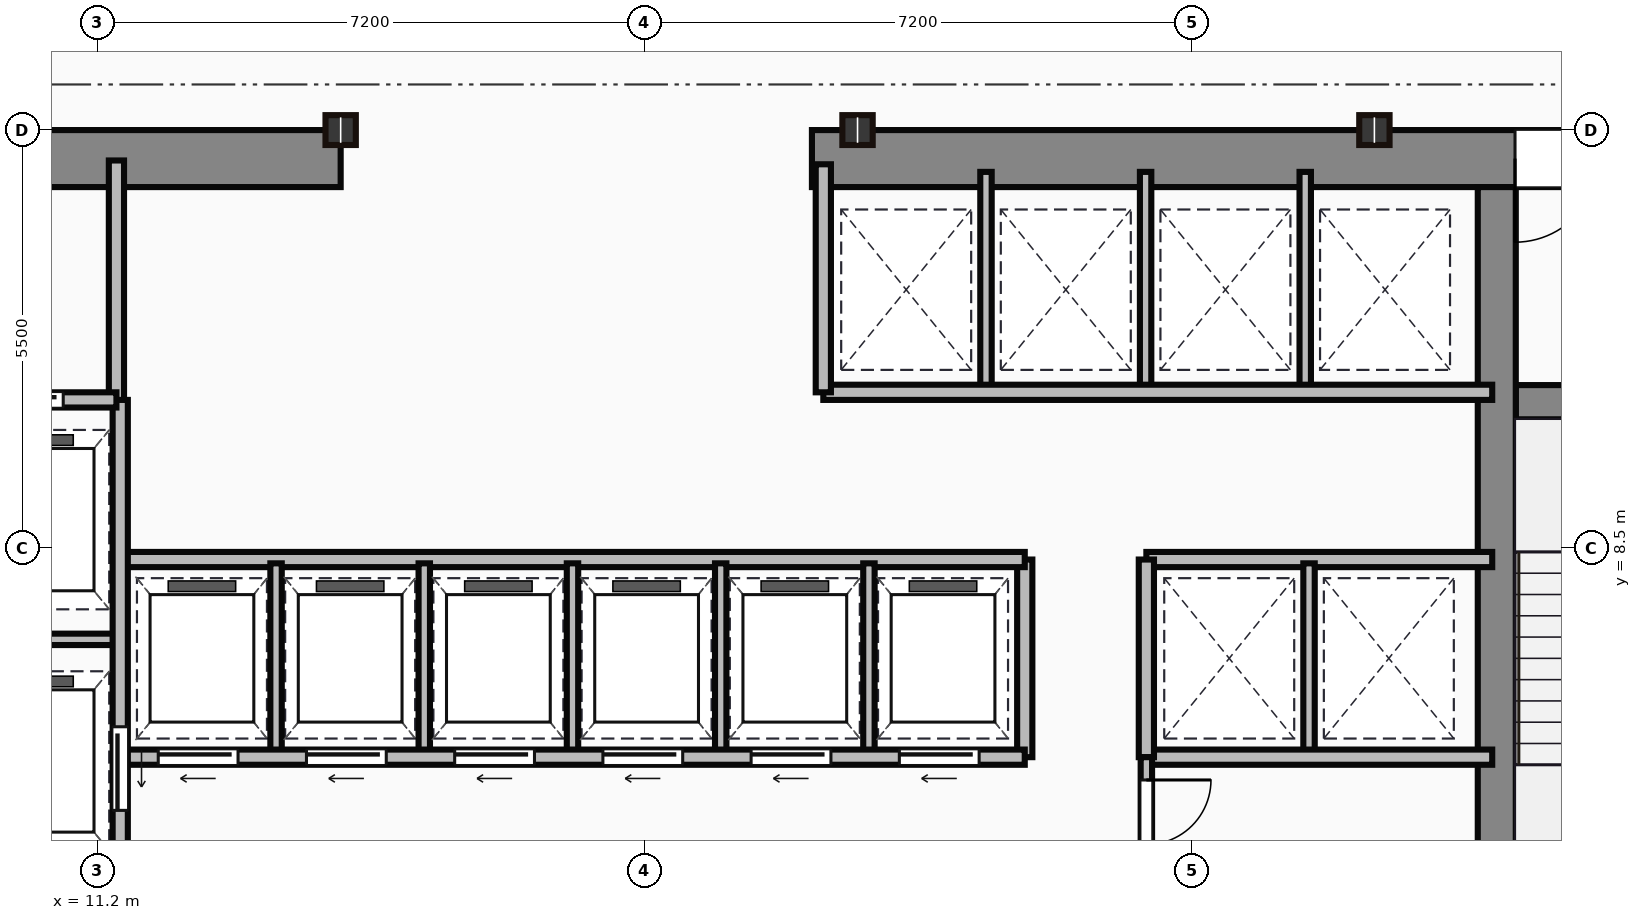
"""IFC4 building model, lengths in metres.
Left out: names, types, materials, properties, quantities, classifications, styles, units other than length and angle.
Written with IfcOpenShell. Run it as: python <this file> out.ifc"""

import sys

from ifc_helpers import new_model, si_unit, direction, frame, frame_2d, origin, origin_2d, place, context, subcontext, project, spatial, rectangle, i_section, extrude, source, transform, mapped, element, fill, save


model = new_model("IFC4")
c1 = context("Model", 3, precision=1e-05, world=origin(), true_north=direction((0.0, 1.0)))
c2 = subcontext(c1, "Body", "Model", "MODEL_VIEW")
j1 = project(units=[si_unit("LENGTHUNIT", "METRE"), si_unit("PLANEANGLEUNIT", "RADIAN")], contexts=[c1])
p1 = place(None, origin())
s1 = spatial("IfcSite", under=j1, at=p1, CompositionType="ELEMENT")
p2 = place(p1, origin())
s2 = spatial("IfcBuilding", under=s1, at=p2, CompositionType="ELEMENT")
p3 = place(p2, frame((0.0, 0.0, 92.3)))
s3 = spatial("IfcBuildingStorey", under=s2, at=p3, CompositionType="ELEMENT", Elevation=92.3)
m1 = source(origin(), c2, "Body", "SweptSolid", [
    extrude(rectangle(XDim=9.1, YDim=0.75, at=frame_2d((4.55, 0.0))), origin(), (0.0, 0.0, 1.0), 3.65),
])
p4 = place(p3, frame((5.3, 13.625, 0.0), z_axis=(0.0, 0.0, 1.0), x_axis=(1.0, 0.0, 0.0)))
e1 = element("IfcWall", 1, at=p4, inside=s3, PredefinedType="SHEAR", context=c2, shape_type="MappedRepresentation", body=[
    mapped(m1, transform((0.0, 0.0, 0.0))),
])
p5 = place(p4, frame((4.1, 0.0, 0.0)))
e2 = element("IfcOpeningElement", 2, at=p5, cuts=e1, PredefinedType="OPENING", context=c2, shape_type="SweptSolid", body=[
    extrude(rectangle(XDim=1.1, YDim=2.15, at=frame_2d((0.55, 1.075))), frame((0.0, 0.385, 0.0), z_axis=(0.0, -1.0, 0.0), x_axis=(1.0, 0.0, 0.0)), (0.0, 0.0, 1.0), 0.77),
])
m2 = source(origin(), c2, "Body", "SweptSolid", [
    extrude(rectangle(XDim=12.6, YDim=0.75, at=frame_2d((6.3, 0.0))), origin(), (0.0, 0.0, 1.0), 3.65),
])
p6 = place(p3, frame((20.6, 13.625, 0.0), z_axis=(0.0, 0.0, 1.0), x_axis=(1.0, 0.0, 0.0)))
e3 = element("IfcWall", 3, at=p6, inside=s3, PredefinedType="SHEAR", context=c2, shape_type="MappedRepresentation", body=[
    mapped(m2, transform((0.0, 0.0, 0.0))),
])
p7 = place(p6, frame((9.25, 0.0, 0.0)))
e4 = element("IfcOpeningElement", 4, at=p7, cuts=e3, PredefinedType="OPENING", context=c2, shape_type="SweptSolid", body=[
    extrude(rectangle(XDim=1.1, YDim=2.15, at=frame_2d((0.55, 1.075))), frame((0.0, 0.385, 0.0), z_axis=(0.0, -1.0, 0.0), x_axis=(1.0, 0.0, 0.0)), (0.0, 0.0, 1.0), 0.77),
])
m3 = source(origin(), c2, "Body", "SweptSolid", [
    extrude(rectangle(XDim=12.35, YDim=0.5, at=frame_2d((6.175, 0.0))), origin(), (0.0, 0.0, 1.0), 3.65),
])
p8 = place(p3, frame((29.61, 0.9, 0.0), z_axis=(0.0, 0.0, 1.0), x_axis=(0.0, 1.0, 0.0)))
e5 = element("IfcWall", 5, at=p8, inside=s3, PredefinedType="SHEAR", context=c2, shape_type="MappedRepresentation", body=[
    mapped(m3, transform((0.0, 0.0, 0.0))),
])
m4 = source(origin(), c2, "Body", "SweptSolid", [
    extrude(rectangle(XDim=3.39, YDim=0.45, at=frame_2d((1.695, 0.0))), origin(), (0.0, 0.0, 1.0), 3.65),
])
p9 = place(p3, frame((29.86, 10.42, 0.0), z_axis=(0.0, 0.0, 1.0), x_axis=(1.0, 0.0, 0.0)))
e6 = element("IfcWall", 6, at=p9, inside=s3, PredefinedType="SHEAR", context=c2, shape_type="MappedRepresentation", body=[
    mapped(m4, transform((0.0, 0.0, 0.0))),
])
p10 = place(p9, frame((1.1, 0.0, 0.0)))
e7 = element("IfcOpeningElement", 7, at=p10, cuts=e6, PredefinedType="OPENING", context=c2, shape_type="SweptSolid", body=[
    extrude(rectangle(XDim=1.1, YDim=2.15, at=frame_2d((0.55, 1.075))), frame((0.0, 0.235, 0.0), z_axis=(0.0, -1.0, 0.0), x_axis=(1.0, 0.0, 0.0)), (0.0, 0.0, 1.0), 0.47),
])
m5 = source(origin(), c2, "Body", "SweptSolid", [
    extrude(i_section(OverallWidth=0.399, OverallDepth=0.393, WebThickness=0.023, FlangeThickness=0.037, at=origin_2d()), origin(), (0.0, 0.0, 1.0), 3.65),
])
for number, where, z_axis, x_axis in (
    (8, (14.4, 14.0, 0.0), (0.0, 0.0, 1.0), (1.0, 0.0, 0.0)),
    (9, (21.2, 14.0, 0.0), (0.0, 0.0, 1.0), (1.0, 0.0, 0.0)),
    (10, (28.0, 14.0, 0.0), (0.0, 0.0, 1.0), (1.0, 0.0, 0.0)),
):
    element("IfcColumn", number, at=place(p3, frame(where, z_axis=z_axis, x_axis=x_axis)), inside=s3, PredefinedType="COLUMN", context=c2, shape_type="MappedRepresentation", body=[
        mapped(m5, transform((0.0, 0.0, 0.0))),
    ])
m6 = source(origin(), c2, "Body", "SweptSolid", [
    extrude(rectangle(XDim=3.18, YDim=0.2, at=frame_2d((1.59, 0.0))), origin(), (0.0, 0.0, 1.0), 3.4),
])
p11 = place(p3, frame((11.45, 10.42, 0.0), z_axis=(0.0, 0.0, 1.0), x_axis=(0.0, 1.0, 0.0)))
e11 = element("IfcWall", 11, at=p11, inside=s3, PredefinedType="PARTITIONING", context=c2, shape_type="MappedRepresentation", body=[
    mapped(m6, transform((0.0, 0.0, 0.0))),
])
m7 = source(origin(), c2, "Body", "SweptSolid", [
    extrude(rectangle(XDim=2.35, YDim=0.2, at=frame_2d((1.175, 0.0))), origin(), (0.0, 0.0, 1.0), 3.4),
])
p12 = place(p3, frame((9.1, 10.45, 0.0), z_axis=(0.0, 0.0, 1.0), x_axis=(1.0, 0.0, 0.0)))
e12 = element("IfcWall", 12, at=p12, inside=s3, PredefinedType="PARTITIONING", context=c2, shape_type="MappedRepresentation", body=[
    mapped(m7, transform((0.0, 0.0, 0.0))),
])
p13 = place(p12, frame((0.55, 0.0, 0.0)))
e13 = element("IfcOpeningElement", 13, at=p13, cuts=e12, PredefinedType="OPENING", context=c2, shape_type="SweptSolid", body=[
    extrude(rectangle(XDim=1.1, YDim=2.15, at=frame_2d((0.55, 1.075))), frame((0.0, 0.11, 0.0), z_axis=(0.0, -1.0, 0.0), x_axis=(1.0, 0.0, 0.0)), (0.0, 0.0, 1.0), 0.22),
])
m8 = source(origin(), c2, "Body", "SweptSolid", [
    extrude(rectangle(XDim=9.6, YDim=0.2, at=frame_2d((4.8, 0.0))), origin(), (0.0, 0.0, 1.0), 3.4),
])
p14 = place(p3, frame((11.5, 0.85, 0.0), z_axis=(0.0, 0.0, 1.0), x_axis=(0.0, 1.0, 0.0)))
e14 = element("IfcWall", 14, at=p14, inside=s3, PredefinedType="PARTITIONING", context=c2, shape_type="MappedRepresentation", body=[
    mapped(m8, transform((0.0, 0.0, 0.0))),
])
p15 = place(p14, frame((4.2, 0.0, 0.0)))
e15 = element("IfcOpeningElement", 15, at=p15, cuts=e14, PredefinedType="OPENING", context=c2, shape_type="SweptSolid", body=[
    extrude(rectangle(XDim=1.1, YDim=2.15, at=frame_2d((0.55, 1.075))), frame((0.0, 0.11, 0.0), z_axis=(0.0, -1.0, 0.0), x_axis=(1.0, 0.0, 0.0)), (0.0, 0.0, 1.0), 0.22),
])
p16 = place(p14, frame((0.9, 0.0, 0.0)))
e16 = element("IfcOpeningElement", 16, at=p16, cuts=e14, PredefinedType="OPENING", context=c2, shape_type="SweptSolid", body=[
    extrude(rectangle(XDim=1.2, YDim=2.15, at=frame_2d((0.6, 1.075))), frame((0.0, 0.11, 0.0), z_axis=(0.0, -1.0, 0.0), x_axis=(1.0, 0.0, 0.0)), (0.0, 0.0, 1.0), 0.22),
])
m9 = source(origin(), c2, "Body", "SweptSolid", [
    extrude(rectangle(XDim=2.4, YDim=0.15, at=frame_2d((1.2, 0.0))), origin(), (0.0, 0.0, 1.0), 3.4),
])
p17 = place(p3, frame((9.1, 7.3, 0.0), z_axis=(0.0, 0.0, 1.0), x_axis=(1.0, 0.0, 0.0)))
e17 = element("IfcWall", 17, at=p17, inside=s3, PredefinedType="PARTITIONING", context=c2, shape_type="MappedRepresentation", body=[
    mapped(m9, transform((0.0, 0.0, 0.0))),
])
m10 = source(origin(), c2, "Body", "SweptSolid", [
    extrude(rectangle(XDim=11.85, YDim=0.2, at=frame_2d((5.925, 0.0))), origin(), (0.0, 0.0, 1.0), 3.4),
])
p18 = place(p3, frame((11.55, 5.75, 0.0), z_axis=(0.0, 0.0, 1.0), x_axis=(1.0, 0.0, 0.0)))
e18 = element("IfcWall", 18, at=p18, inside=s3, PredefinedType="PARTITIONING", context=c2, shape_type="MappedRepresentation", body=[
    mapped(m10, transform((0.0, 0.0, 0.0))),
])
p19 = place(p18, frame((0.45, 0.0, 0.0)))
e19 = element("IfcOpeningElement", 19, at=p19, cuts=e18, PredefinedType="OPENING", context=c2, shape_type="SweptSolid", body=[
    extrude(rectangle(XDim=1.05, YDim=2.15, at=frame_2d((0.525, 1.075))), frame((0.0, 0.11, 0.0), z_axis=(0.0, -1.0, 0.0), x_axis=(1.0, 0.0, 0.0)), (0.0, 0.0, 1.0), 0.22),
])
p20 = place(p18, frame((2.4, 0.0, 0.0)))
e20 = element("IfcOpeningElement", 20, at=p20, cuts=e18, PredefinedType="OPENING", context=c2, shape_type="SweptSolid", body=[
    extrude(rectangle(XDim=1.05, YDim=2.15, at=frame_2d((0.525, 1.075))), frame((0.0, 0.11, 0.0), z_axis=(0.0, -1.0, 0.0), x_axis=(1.0, 0.0, 0.0)), (0.0, 0.0, 1.0), 0.22),
])
p21 = place(p18, frame((4.35, 0.0, 0.0)))
e21 = element("IfcOpeningElement", 21, at=p21, cuts=e18, PredefinedType="OPENING", context=c2, shape_type="SweptSolid", body=[
    extrude(rectangle(XDim=1.05, YDim=2.15, at=frame_2d((0.525, 1.075))), frame((0.0, 0.11, 0.0), z_axis=(0.0, -1.0, 0.0), x_axis=(1.0, 0.0, 0.0)), (0.0, 0.0, 1.0), 0.22),
])
p22 = place(p18, frame((6.3, 0.0, 0.0)))
e22 = element("IfcOpeningElement", 22, at=p22, cuts=e18, PredefinedType="OPENING", context=c2, shape_type="SweptSolid", body=[
    extrude(rectangle(XDim=1.05, YDim=2.15, at=frame_2d((0.525, 1.075))), frame((0.0, 0.11, 0.0), z_axis=(0.0, -1.0, 0.0), x_axis=(1.0, 0.0, 0.0)), (0.0, 0.0, 1.0), 0.22),
])
p23 = place(p18, frame((8.25, 0.0, 0.0)))
e23 = element("IfcOpeningElement", 23, at=p23, cuts=e18, PredefinedType="OPENING", context=c2, shape_type="SweptSolid", body=[
    extrude(rectangle(XDim=1.05, YDim=2.15, at=frame_2d((0.525, 1.075))), frame((0.0, 0.11, 0.0), z_axis=(0.0, -1.0, 0.0), x_axis=(1.0, 0.0, 0.0)), (0.0, 0.0, 1.0), 0.22),
])
p24 = place(p18, frame((10.2, 0.0, 0.0)))
e24 = element("IfcOpeningElement", 24, at=p24, cuts=e18, PredefinedType="OPENING", context=c2, shape_type="SweptSolid", body=[
    extrude(rectangle(XDim=1.05, YDim=2.15, at=frame_2d((0.525, 1.075))), frame((0.0, 0.11, 0.0), z_axis=(0.0, -1.0, 0.0), x_axis=(1.0, 0.0, 0.0)), (0.0, 0.0, 1.0), 0.22),
])
p25 = place(p3, frame((11.55, 8.35, 0.0), z_axis=(0.0, 0.0, 1.0), x_axis=(1.0, 0.0, 0.0)))
e25 = element("IfcWall", 25, at=p25, inside=s3, PredefinedType="PARTITIONING", context=c2, shape_type="MappedRepresentation", body=[
    mapped(m10, transform((0.0, 0.0, 0.0))),
])
m11 = source(origin(), c2, "Body", "SweptSolid", [
    extrude(rectangle(XDim=2.6, YDim=0.2, at=frame_2d((1.3, 0.0))), origin(), (0.0, 0.0, 1.0), 3.4),
])
p26 = place(p3, frame((23.4, 5.75, 0.0), z_axis=(0.0, 0.0, 1.0), x_axis=(0.0, 1.0, 0.0)))
e26 = element("IfcWall", 26, at=p26, inside=s3, PredefinedType="PARTITIONING", context=c2, shape_type="MappedRepresentation", body=[
    mapped(m11, transform((0.0, 0.0, 0.0))),
])
m12 = source(origin(), c2, "Body", "SweptSolid", [
    extrude(rectangle(XDim=2.5, YDim=0.15, at=frame_2d((1.25, 0.0))), origin(), (0.0, 0.0, 1.0), 3.4),
])
for number, where, z_axis, x_axis in (
    (27, (13.55, 5.8, 0.0), (0.0, 0.0, 1.0), (0.0, 1.0, 0.0)),
    (28, (15.5, 5.8, 0.0), (0.0, 0.0, 1.0), (0.0, 1.0, 0.0)),
    (29, (17.45, 5.8, 0.0), (0.0, 0.0, 1.0), (0.0, 1.0, 0.0)),
    (30, (19.4, 5.8, 0.0), (0.0, 0.0, 1.0), (0.0, 1.0, 0.0)),
    (31, (21.35, 5.8, 0.0), (0.0, 0.0, 1.0), (0.0, 1.0, 0.0)),
):
    element("IfcWall", number, at=place(p3, frame(where, z_axis=z_axis, x_axis=x_axis)), inside=s3, PredefinedType="PARTITIONING", context=c2, shape_type="MappedRepresentation", body=[
        mapped(m12, transform((0.0, 0.0, 0.0))),
    ])
m13 = source(origin(), c2, "Body", "SweptSolid", [
    extrude(rectangle(XDim=8.8, YDim=0.2, at=frame_2d((4.4, 0.0))), origin(), (0.0, 0.0, 1.0), 3.4),
])
p27 = place(p3, frame((20.75, 10.55, 0.0), z_axis=(0.0, 0.0, 1.0), x_axis=(1.0, 0.0, 0.0)))
e32 = element("IfcWall", 32, at=p27, inside=s3, PredefinedType="PARTITIONING", context=c2, shape_type="MappedRepresentation", body=[
    mapped(m13, transform((0.0, 0.0, 0.0))),
])
m14 = source(origin(), c2, "Body", "SweptSolid", [
    extrude(rectangle(XDim=3.0, YDim=0.2, at=frame_2d((1.5, 0.0))), origin(), (0.0, 0.0, 1.0), 3.4),
])
p28 = place(p3, frame((20.75, 10.55, 0.0), z_axis=(0.0, 0.0, 1.0), x_axis=(0.0, 1.0, 0.0)))
e33 = element("IfcWall", 33, at=p28, inside=s3, PredefinedType="PARTITIONING", context=c2, shape_type="MappedRepresentation", body=[
    mapped(m14, transform((0.0, 0.0, 0.0))),
])
m15 = source(origin(), c2, "Body", "SweptSolid", [
    extrude(rectangle(XDim=2.85, YDim=0.15, at=frame_2d((1.425, 0.0))), origin(), (0.0, 0.0, 1.0), 3.4),
])
for number, where, z_axis, x_axis in (
    (34, (22.89, 10.6, 0.0), (0.0, 0.0, 1.0), (0.0, 1.0, 0.0)),
    (35, (24.99, 10.6, 0.0), (0.0, 0.0, 1.0), (0.0, 1.0, 0.0)),
    (36, (27.09, 10.6, 0.0), (0.0, 0.0, 1.0), (0.0, 1.0, 0.0)),
):
    element("IfcWall", number, at=place(p3, frame(where, z_axis=z_axis, x_axis=x_axis)), inside=s3, PredefinedType="PARTITIONING", context=c2, shape_type="MappedRepresentation", body=[
        mapped(m15, transform((0.0, 0.0, 0.0))),
    ])
m16 = source(origin(), c2, "Body", "SweptSolid", [
    extrude(rectangle(XDim=4.55, YDim=0.2, at=frame_2d((2.275, 0.0))), origin(), (0.0, 0.0, 1.0), 3.4),
])
for number, where, z_axis, x_axis in (
    (37, (25.0, 8.35, 0.0), (0.0, 0.0, 1.0), (1.0, 0.0, 0.0)),
    (38, (25.0, 5.75, 0.0), (0.0, 0.0, 1.0), (1.0, 0.0, 0.0)),
):
    element("IfcWall", number, at=place(p3, frame(where, z_axis=z_axis, x_axis=x_axis)), inside=s3, PredefinedType="PARTITIONING", context=c2, shape_type="MappedRepresentation", body=[
        mapped(m16, transform((0.0, 0.0, 0.0))),
    ])
p29 = place(p3, frame((25.0, 5.75, 0.0), z_axis=(0.0, 0.0, 1.0), x_axis=(0.0, 1.0, 0.0)))
e39 = element("IfcWall", 39, at=p29, inside=s3, PredefinedType="PARTITIONING", context=c2, shape_type="MappedRepresentation", body=[
    mapped(m11, transform((0.0, 0.0, 0.0))),
])
p30 = place(p3, frame((27.14, 5.8, 0.0), z_axis=(0.0, 0.0, 1.0), x_axis=(0.0, 1.0, 0.0)))
e40 = element("IfcWall", 40, at=p30, inside=s3, PredefinedType="PARTITIONING", context=c2, shape_type="MappedRepresentation", body=[
    mapped(m12, transform((0.0, 0.0, 0.0))),
])
m17 = source(origin(), c2, "Body", "SweptSolid", [
    extrude(rectangle(XDim=4.9, YDim=0.15, at=frame_2d((2.45, 0.0))), origin(), (0.0, 0.0, 1.0), 3.4),
])
p31 = place(p3, frame((25.0, 0.85, 0.0), z_axis=(0.0, 0.0, 1.0), x_axis=(0.0, 1.0, 0.0)))
e41 = element("IfcWall", 41, at=p31, inside=s3, PredefinedType="PARTITIONING", context=c2, shape_type="MappedRepresentation", body=[
    mapped(m17, transform((0.0, 0.0, 0.0))),
])
p32 = place(p31, frame((2.0, 0.0, 0.0)))
e42 = element("IfcOpeningElement", 42, at=p32, cuts=e41, PredefinedType="OPENING", context=c2, shape_type="SweptSolid", body=[
    extrude(rectangle(XDim=0.95, YDim=2.15, at=frame_2d((0.475, 1.075))), frame((0.0, 0.085, 0.0), z_axis=(0.0, -1.0, 0.0), x_axis=(1.0, 0.0, 0.0)), (0.0, 0.0, 1.0), 0.17),
])
p33 = place(p31, frame((3.75, 0.0, 0.0)))
e43 = element("IfcOpeningElement", 43, at=p33, cuts=e41, PredefinedType="OPENING", context=c2, shape_type="SweptSolid", body=[
    extrude(rectangle(XDim=0.85, YDim=2.15, at=frame_2d((0.425, 1.075))), frame((0.0, 0.085, 0.0), z_axis=(0.0, -1.0, 0.0), x_axis=(1.0, 0.0, 0.0)), (0.0, 0.0, 1.0), 0.17),
])
m18 = source(origin(), c2, "Body", "SweptSolid", [
    extrude(rectangle(XDim=1.1, YDim=2.15, at=frame_2d((0.55, 1.075))), frame((0.0, 0.025, 0.0), z_axis=(0.0, -1.0, 0.0), x_axis=(1.0, 0.0, 0.0)), (0.0, 0.0, 1.0), 0.05),
])
p34 = place(p7, origin())
e44 = element("IfcDoor", 44, at=p34, inside=s3, OperationType="SINGLE_SWING_LEFT", PredefinedType="DOOR", context=c2, shape_type="MappedRepresentation", body=[
    mapped(m18, transform((0.0, 0.0, 0.0))),
])
fill(e4, e44)
p35 = place(p13, origin())
e45 = element("IfcDoor", 45, at=p35, inside=s3, OperationType="SLIDING_TO_LEFT", PredefinedType="DOOR", context=c2, shape_type="MappedRepresentation", body=[
    mapped(m18, transform((0.0, 0.0, 0.0))),
])
fill(e13, e45)
p36 = place(p15, frame((1.1, 0.0, 0.0), z_axis=(0.0, 0.0, 1.0), x_axis=(-1.0, 0.0, 0.0)))
e46 = element("IfcDoor", 46, at=p36, inside=s3, OperationType="SLIDING_TO_LEFT", PredefinedType="DOOR", context=c2, shape_type="MappedRepresentation", body=[
    mapped(m18, transform((0.0, 0.0, 0.0))),
])
fill(e15, e46)
m19 = source(origin(), c2, "Body", "SweptSolid", [
    extrude(rectangle(XDim=1.05, YDim=2.15, at=frame_2d((0.525, 1.075))), frame((0.0, 0.025, 0.0), z_axis=(0.0, -1.0, 0.0), x_axis=(1.0, 0.0, 0.0)), (0.0, 0.0, 1.0), 0.05),
])
p37 = place(p19, frame((1.05, 0.0, 0.0), z_axis=(0.0, 0.0, 1.0), x_axis=(-1.0, 0.0, 0.0)))
e47 = element("IfcDoor", 47, at=p37, inside=s3, OperationType="SLIDING_TO_LEFT", PredefinedType="DOOR", context=c2, shape_type="MappedRepresentation", body=[
    mapped(m19, transform((0.0, 0.0, 0.0))),
])
fill(e19, e47)
p38 = place(p20, frame((1.05, 0.0, 0.0), z_axis=(0.0, 0.0, 1.0), x_axis=(-1.0, 0.0, 0.0)))
e48 = element("IfcDoor", 48, at=p38, inside=s3, OperationType="SLIDING_TO_LEFT", PredefinedType="DOOR", context=c2, shape_type="MappedRepresentation", body=[
    mapped(m19, transform((0.0, 0.0, 0.0))),
])
fill(e20, e48)
p39 = place(p21, frame((1.05, 0.0, 0.0), z_axis=(0.0, 0.0, 1.0), x_axis=(-1.0, 0.0, 0.0)))
e49 = element("IfcDoor", 49, at=p39, inside=s3, OperationType="SLIDING_TO_LEFT", PredefinedType="DOOR", context=c2, shape_type="MappedRepresentation", body=[
    mapped(m19, transform((0.0, 0.0, 0.0))),
])
fill(e21, e49)
p40 = place(p22, frame((1.05, 0.0, 0.0), z_axis=(0.0, 0.0, 1.0), x_axis=(-1.0, 0.0, 0.0)))
e50 = element("IfcDoor", 50, at=p40, inside=s3, OperationType="SLIDING_TO_LEFT", PredefinedType="DOOR", context=c2, shape_type="MappedRepresentation", body=[
    mapped(m19, transform((0.0, 0.0, 0.0))),
])
fill(e22, e50)
p41 = place(p23, frame((1.05, 0.0, 0.0), z_axis=(0.0, 0.0, 1.0), x_axis=(-1.0, 0.0, 0.0)))
e51 = element("IfcDoor", 51, at=p41, inside=s3, OperationType="SLIDING_TO_LEFT", PredefinedType="DOOR", context=c2, shape_type="MappedRepresentation", body=[
    mapped(m19, transform((0.0, 0.0, 0.0))),
])
fill(e23, e51)
p42 = place(p24, frame((1.05, 0.0, 0.0), z_axis=(0.0, 0.0, 1.0), x_axis=(-1.0, 0.0, 0.0)))
e52 = element("IfcDoor", 52, at=p42, inside=s3, OperationType="SLIDING_TO_LEFT", PredefinedType="DOOR", context=c2, shape_type="MappedRepresentation", body=[
    mapped(m19, transform((0.0, 0.0, 0.0))),
])
fill(e24, e52)
m20 = source(origin(), c2, "Body", "SweptSolid", [
    extrude(rectangle(XDim=0.85, YDim=2.15, at=frame_2d((0.425, 1.075))), frame((0.0, 0.025, 0.0), z_axis=(0.0, -1.0, 0.0), x_axis=(1.0, 0.0, 0.0)), (0.0, 0.0, 1.0), 0.05),
])
p43 = place(p33, origin())
e53 = element("IfcDoor", 53, at=p43, inside=s3, OperationType="SINGLE_SWING_RIGHT", PredefinedType="DOOR", context=c2, shape_type="MappedRepresentation", body=[
    mapped(m20, transform((0.0, 0.0, 0.0))),
])
fill(e43, e53)
save(model, sys.argv[1])
